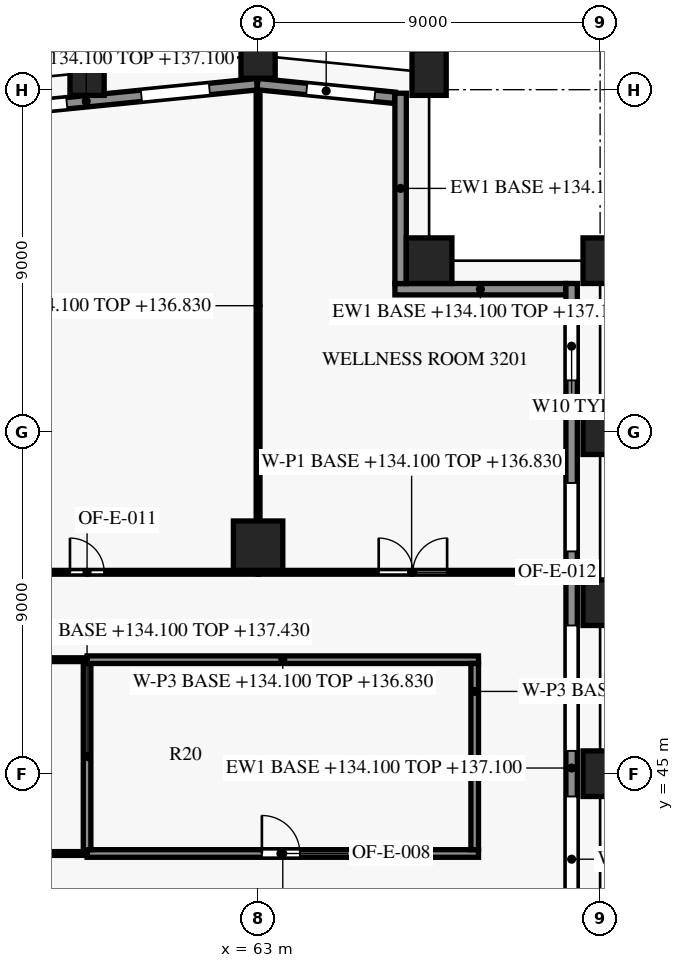
"""IFC4 building model, lengths in metres.
Left out: names, types, materials, properties, quantities, classifications, styles, units other than length and angle.
Written with IfcOpenShell. Run it as: python <this file> out.ifc"""

import sys

from ifc_helpers import new_model, si_unit, direction, frame, frame_2d, origin, origin_2d, place, context, subcontext, project, spatial, rectangle, extrude, element, fill, save


model = new_model("IFC4")
c1 = context("Model", 3, precision=1e-05, world=origin(), true_north=direction((0.0, 1.0)))
c2 = subcontext(c1, "Body", "Model", "MODEL_VIEW")
j1 = project(units=[si_unit("LENGTHUNIT", "METRE"), si_unit("PLANEANGLEUNIT", "RADIAN")], contexts=[c1])
p1 = place(None, origin())
s1 = spatial("IfcSite", under=j1, at=p1, CompositionType="ELEMENT")
p2 = place(p1, origin())
s2 = spatial("IfcBuilding", under=s1, at=p2, CompositionType="ELEMENT")
p3 = place(p2, frame((0.0, 0.0, 134.1)))
s3 = spatial("IfcBuildingStorey", under=s2, at=p3, CompositionType="ELEMENT", Elevation=134.1)
for number, where, z_axis, x_axis in (
    (1, (72.0, 45.0, 0.0), (0.0, 0.0, 1.0), (0.0, 1.0, 0.0)),
    (2, (72.0, 49.5, 0.0), (0.0, 0.0, 1.0), (0.0, 1.0, 0.0)),
    (3, (72.0, 54.0, 0.0), (0.0, 0.0, 1.0), (0.0, 1.0, 0.0)),
    (4, (72.0, 58.5, 0.0), (0.0, 0.0, 1.0), (0.0, 1.0, 0.0)),
    (5, (67.5, 63.45, 0.0), (0.0, 0.0, 1.0), (-0.995, 0.1, 0.0)),
    (6, (63.0, 63.9, 0.0), (0.0, 0.0, 1.0), (-1.0, 0.0, 0.0)),
    (7, (58.5, 63.45, 0.0), (0.0, 0.0, 1.0), (-0.995, -0.1, 0.0)),
):
    element("IfcColumn", number, at=place(p3, frame(where, z_axis=z_axis, x_axis=x_axis)), inside=s3, PredefinedType="COLUMN", context=c2, shape_type="SweptSolid", body=[
        extrude(rectangle(XDim=0.9, YDim=1.2, at=origin_2d()), origin(), (0.0, 0.0, 1.0), 3.8),
    ])
p4 = place(p3, frame((67.5, 58.5, 0.0), z_axis=(0.0, 0.0, 1.0), x_axis=(1.0, 0.0, 0.0)))
e8 = element("IfcColumn", 8, at=p4, inside=s3, PredefinedType="COLUMN", context=c2, shape_type="SweptSolid", body=[
    extrude(rectangle(XDim=1.2, YDim=1.2, at=origin_2d()), origin(), (0.0, 0.0, 1.0), 3.8),
])
p5 = place(p3, frame((63.0, 51.0, 0.0), z_axis=(0.0, 0.0, 1.0), x_axis=(1.0, 0.0, 0.0)))
e9 = element("IfcColumn", 9, at=p5, inside=s3, PredefinedType="COLUMN", context=c2, shape_type="SweptSolid", body=[
    extrude(rectangle(XDim=1.3, YDim=1.3, at=origin_2d()), origin(), (0.0, 0.0, 1.0), 3.8),
])
p6 = place(p3, frame((71.25, 57.9, 0.0), z_axis=(0.0, 0.0, 1.0), x_axis=(0.0, -1.0, 0.0)))
e10 = element("IfcWall", 10, at=p6, inside=s3, PredefinedType="SOLIDWALL", context=c2, shape_type="SweptSolid", body=[
    extrude(rectangle(XDim=25.502, YDim=0.3, at=frame_2d((12.751, 0.0))), origin(), (0.0, 0.0, 1.0), 3.0),
])
p7 = place(p6, frame((0.75, 0.0, 0.75)))
e11 = element("IfcOpeningElement", 11, at=p7, cuts=e10, PredefinedType="OPENING", context=c2, shape_type="SweptSolid", body=[
    extrude(rectangle(XDim=1.8, YDim=1.8, at=frame_2d((0.9, 0.9))), frame((0.0, 0.16, 0.0), z_axis=(0.0, -1.0, 0.0), x_axis=(1.0, 0.0, 0.0)), (0.0, 0.0, 1.0), 0.32),
])
p8 = place(p6, frame((5.25, 0.0, 0.75)))
e12 = element("IfcOpeningElement", 12, at=p8, cuts=e10, PredefinedType="OPENING", context=c2, shape_type="SweptSolid", body=[
    extrude(rectangle(XDim=1.8, YDim=1.8, at=frame_2d((0.9, 0.9))), frame((0.0, 0.16, 0.0), z_axis=(0.0, -1.0, 0.0), x_axis=(1.0, 0.0, 0.0)), (0.0, 0.0, 1.0), 0.32),
])
p9 = place(p6, frame((9.0, 0.0, 0.15)))
e13 = element("IfcOpeningElement", 13, at=p9, cuts=e10, PredefinedType="OPENING", context=c2, shape_type="SweptSolid", body=[
    extrude(rectangle(XDim=3.3, YDim=2.4, at=frame_2d((1.65, 1.2))), frame((0.0, 0.16, 0.0), z_axis=(0.0, -1.0, 0.0), x_axis=(1.0, 0.0, 0.0)), (0.0, 0.0, 1.0), 0.32),
])
p10 = place(p6, frame((13.5, 0.0, 0.15)))
e14 = element("IfcOpeningElement", 14, at=p10, cuts=e10, PredefinedType="OPENING", context=c2, shape_type="SweptSolid", body=[
    extrude(rectangle(XDim=3.3, YDim=2.4, at=frame_2d((1.65, 1.2))), frame((0.0, 0.16, 0.0), z_axis=(0.0, -1.0, 0.0), x_axis=(1.0, 0.0, 0.0)), (0.0, 0.0, 1.0), 0.32),
])
p11 = place(p6, frame((18.75, 0.0, 0.75)))
e15 = element("IfcOpeningElement", 15, at=p11, cuts=e10, PredefinedType="OPENING", context=c2, shape_type="SweptSolid", body=[
    extrude(rectangle(XDim=1.8, YDim=1.8, at=frame_2d((0.9, 0.9))), frame((0.0, 0.16, 0.0), z_axis=(0.0, -1.0, 0.0), x_axis=(1.0, 0.0, 0.0)), (0.0, 0.0, 1.0), 0.32),
])
p12 = place(p6, frame((23.25, 0.0, 0.75)))
e16 = element("IfcOpeningElement", 16, at=p12, cuts=e10, PredefinedType="OPENING", context=c2, shape_type="SweptSolid", body=[
    extrude(rectangle(XDim=1.8, YDim=1.8, at=frame_2d((0.9, 0.9))), frame((0.0, 0.16, 0.0), z_axis=(0.0, -1.0, 0.0), x_axis=(1.0, 0.0, 0.0)), (0.0, 0.0, 1.0), 0.32),
])
p13 = place(p3, frame((66.6, 57.75, 0.0), z_axis=(0.0, 0.0, 1.0), x_axis=(1.0, 0.0, 0.0)))
e17 = element("IfcWall", 17, at=p13, inside=s3, PredefinedType="SOLIDWALL", context=c2, shape_type="SweptSolid", body=[
    extrude(rectangle(XDim=4.5, YDim=0.3, at=frame_2d((2.25, 0.0))), origin(), (0.0, 0.0, 1.0), 3.0),
])
p14 = place(p3, frame((66.75, 62.907, 0.0), z_axis=(0.0, 0.0, 1.0), x_axis=(0.0, -1.0, 0.0)))
e18 = element("IfcWall", 18, at=p14, inside=s3, PredefinedType="SOLIDWALL", context=c2, shape_type="SweptSolid", body=[
    extrude(rectangle(XDim=5.009, YDim=0.3, at=frame_2d((2.504, 0.0))), origin(), (0.0, 0.0, 1.0), 3.0),
])
p15 = place(p3, frame((62.985, 63.148, 0.0), z_axis=(0.0, 0.0, 1.0), x_axis=(0.995038521274, -0.099490407478, 0.0)))
e19 = element("IfcWall", 19, at=p15, inside=s3, PredefinedType="SOLIDWALL", context=c2, shape_type="SweptSolid", body=[
    extrude(rectangle(XDim=3.632, YDim=0.3, at=frame_2d((1.816, 0.0))), origin(), (0.0, 0.0, 1.0), 3.0),
])
p16 = place(p15, frame((1.301, 0.0, 0.75)))
e20 = element("IfcOpeningElement", 20, at=p16, cuts=e19, PredefinedType="OPENING", context=c2, shape_type="SweptSolid", body=[
    extrude(rectangle(XDim=1.8, YDim=1.8, at=frame_2d((0.9, 0.9))), frame((0.0, 0.16, 0.0), z_axis=(0.0, -1.0, 0.0), x_axis=(1.0, 0.0, 0.0)), (0.0, 0.0, 1.0), 0.32),
])
p17 = place(p3, frame((53.985, 62.245, 0.0), z_axis=(0.0, 0.0, 1.0), x_axis=(0.995037993253, 0.099495688264, 0.0)))
e21 = element("IfcWall", 21, at=p17, inside=s3, PredefinedType="SOLIDWALL", context=c2, shape_type="SweptSolid", body=[
    extrude(rectangle(XDim=9.03, YDim=0.3, at=frame_2d((4.515, 0.0))), origin(), (0.0, 0.0, 1.0), 3.0),
])
p18 = place(p17, frame((0.701, 0.0, 0.15)))
e22 = element("IfcOpeningElement", 22, at=p18, cuts=e21, PredefinedType="OPENING", context=c2, shape_type="SweptSolid", body=[
    extrude(rectangle(XDim=3.3, YDim=2.4, at=frame_2d((1.65, 1.2))), frame((0.0, 0.16, 0.0), z_axis=(0.0, -1.0, 0.0), x_axis=(1.0, 0.0, 0.0)), (0.0, 0.0, 1.0), 0.32),
])
p19 = place(p17, frame((5.974, 0.0, 0.75)))
e23 = element("IfcOpeningElement", 23, at=p19, cuts=e21, PredefinedType="OPENING", context=c2, shape_type="SweptSolid", body=[
    extrude(rectangle(XDim=1.8, YDim=1.8, at=frame_2d((0.9, 0.9))), frame((0.0, 0.16, 0.0), z_axis=(0.0, -1.0, 0.0), x_axis=(1.0, 0.0, 0.0)), (0.0, 0.0, 1.0), 0.32),
])
p20 = place(p3, frame((51.3, 42.9, 0.0), z_axis=(0.0, 0.0, 1.0), x_axis=(1.0, 0.0, 0.0)))
e24 = element("IfcWall", 24, at=p20, inside=s3, PredefinedType="PARTITIONING", context=c2, shape_type="SweptSolid", body=[
    extrude(rectangle(XDim=7.2, YDim=0.1, at=frame_2d((3.6, 0.0))), origin(), (0.0, 0.0, 1.0), 2.63),
])
p21 = place(p3, frame((58.5, 42.9, 0.0), z_axis=(0.0, 0.0, 1.0), x_axis=(1.0, 0.0, 0.0)))
e25 = element("IfcWall", 25, at=p21, inside=s3, PredefinedType="PARTITIONING", context=c2, shape_type="SweptSolid", body=[
    extrude(rectangle(XDim=10.3, YDim=0.2, at=frame_2d((5.15, 0.0))), origin(), (0.0, 0.0, 1.0), 2.73),
])
p22 = place(p21, frame((4.6, 0.0, 0.0)))
e26 = element("IfcOpeningElement", 26, at=p22, cuts=e25, PredefinedType="OPENING", context=c2, shape_type="SweptSolid", body=[
    extrude(rectangle(XDim=1.0, YDim=2.1, at=frame_2d((0.5, 1.05))), frame((0.0, 0.11, 0.0), z_axis=(0.0, -1.0, 0.0), x_axis=(1.0, 0.0, 0.0)), (0.0, 0.0, 1.0), 0.22),
])
for number, where, z_axis, x_axis in (
    (27, (68.7, 43.0, 0.0), (0.0, 0.0, 1.0), (0.0, 1.0, 0.0)),
    (28, (58.5, 47.9, 0.0), (0.0, 0.0, 1.0), (0.0, -1.0, 0.0)),
):
    element("IfcWall", number, at=place(p3, frame(where, z_axis=z_axis, x_axis=x_axis)), inside=s3, PredefinedType="PARTITIONING", context=c2, shape_type="SweptSolid", body=[
        extrude(rectangle(XDim=4.9, YDim=0.2, at=frame_2d((2.45, 0.0))), origin(), (0.0, 0.0, 1.0), 3.33),
    ])
p23 = place(p3, frame((58.5, 48.0, 0.0), z_axis=(0.0, 0.0, 1.0), x_axis=(-1.0, 0.0, 0.0)))
e29 = element("IfcWall", 29, at=p23, inside=s3, PredefinedType="PARTITIONING", context=c2, shape_type="SweptSolid", body=[
    extrude(rectangle(XDim=13.5, YDim=0.1, at=frame_2d((6.75, 0.0))), origin(), (0.0, 0.0, 1.0), 2.73),
])
p24 = place(p23, frame((8.1, 0.0, 0.0)))
e30 = element("IfcOpeningElement", 30, at=p24, cuts=e29, PredefinedType="OPENING", context=c2, shape_type="SweptSolid", body=[
    extrude(rectangle(XDim=1.8, YDim=2.1, at=frame_2d((0.9, 1.05))), frame((0.0, 0.06, 0.0), z_axis=(0.0, -1.0, 0.0), x_axis=(1.0, 0.0, 0.0)), (0.0, 0.0, 1.0), 0.12),
])
p25 = place(p3, frame((68.8, 48.0, 0.0), z_axis=(0.0, 0.0, 1.0), x_axis=(-1.0, 0.0, 0.0)))
e31 = element("IfcWall", 31, at=p25, inside=s3, PredefinedType="PARTITIONING", context=c2, shape_type="SweptSolid", body=[
    extrude(rectangle(XDim=10.3, YDim=0.2, at=frame_2d((5.15, 0.0))), origin(), (0.0, 0.0, 1.0), 2.73),
])
p26 = place(p3, frame((45.0, 50.3, 0.0), z_axis=(0.0, 0.0, 1.0), x_axis=(1.0, 0.0, 0.0)))
e32 = element("IfcWall", 32, at=p26, inside=s3, PredefinedType="PARTITIONING", context=c2, shape_type="SweptSolid", body=[
    extrude(rectangle(XDim=18.0, YDim=0.1, at=frame_2d((9.0, 0.0))), origin(), (0.0, 0.0, 1.0), 2.73),
])
p27 = place(p26, frame((13.05, 0.0, 0.0)))
e33 = element("IfcOpeningElement", 33, at=p27, cuts=e32, PredefinedType="OPENING", context=c2, shape_type="SweptSolid", body=[
    extrude(rectangle(XDim=0.9, YDim=2.1, at=frame_2d((0.45, 1.05))), frame((0.0, 0.06, 0.0), z_axis=(0.0, -1.0, 0.0), x_axis=(1.0, 0.0, 0.0)), (0.0, 0.0, 1.0), 0.12),
])
p28 = place(p3, frame((63.0, 50.3, 0.0), z_axis=(0.0, 0.0, 1.0), x_axis=(1.0, 0.0, 0.0)))
e34 = element("IfcWall", 34, at=p28, inside=s3, PredefinedType="PARTITIONING", context=c2, shape_type="SweptSolid", body=[
    extrude(rectangle(XDim=8.08, YDim=0.1, at=frame_2d((4.04, 0.0))), origin(), (0.0, 0.0, 1.0), 2.73),
])
p29 = place(p28, frame((3.174, 0.0, 0.0)))
e35 = element("IfcOpeningElement", 35, at=p29, cuts=e34, PredefinedType="OPENING", context=c2, shape_type="SweptSolid", body=[
    extrude(rectangle(XDim=1.8, YDim=2.1, at=frame_2d((0.9, 1.05))), frame((0.0, 0.06, 0.0), z_axis=(0.0, -1.0, 0.0), x_axis=(1.0, 0.0, 0.0)), (0.0, 0.0, 1.0), 0.12),
])
p30 = place(p3, frame((63.0, 62.976, 0.0), z_axis=(0.0, 0.0, 1.0), x_axis=(0.0, -1.0, 0.0)))
e36 = element("IfcWall", 36, at=p30, inside=s3, PredefinedType="PARTITIONING", context=c2, shape_type="SweptSolid", body=[
    extrude(rectangle(XDim=11.321, YDim=0.1, at=frame_2d((5.66, 0.0))), origin(), (0.0, 0.0, 1.0), 2.73),
])
p31 = place(p7, origin())
e37 = element("IfcWindow", 37, at=p31, inside=s3, PartitioningType="SINGLE_PANEL", PredefinedType="WINDOW", context=c2, shape_type="SweptSolid", body=[
    extrude(rectangle(XDim=1.8, YDim=1.8, at=frame_2d((0.9, 0.9))), frame((0.0, 0.03, 0.0), z_axis=(0.0, -1.0, 0.0), x_axis=(1.0, 0.0, 0.0)), (0.0, 0.0, 1.0), 0.06),
])
fill(e11, e37)
p32 = place(p8, origin())
e38 = element("IfcWindow", 38, at=p32, inside=s3, PartitioningType="SINGLE_PANEL", PredefinedType="WINDOW", context=c2, shape_type="SweptSolid", body=[
    extrude(rectangle(XDim=1.8, YDim=1.8, at=frame_2d((0.9, 0.9))), frame((0.0, 0.03, 0.0), z_axis=(0.0, -1.0, 0.0), x_axis=(1.0, 0.0, 0.0)), (0.0, 0.0, 1.0), 0.06),
])
fill(e12, e38)
p33 = place(p9, origin())
e39 = element("IfcWindow", 39, at=p33, inside=s3, PartitioningType="SINGLE_PANEL", PredefinedType="WINDOW", context=c2, shape_type="SweptSolid", body=[
    extrude(rectangle(XDim=3.3, YDim=2.4, at=frame_2d((1.65, 1.2))), frame((0.0, 0.03, 0.0), z_axis=(0.0, -1.0, 0.0), x_axis=(1.0, 0.0, 0.0)), (0.0, 0.0, 1.0), 0.06),
])
fill(e13, e39)
p34 = place(p10, origin())
e40 = element("IfcWindow", 40, at=p34, inside=s3, PartitioningType="SINGLE_PANEL", PredefinedType="WINDOW", context=c2, shape_type="SweptSolid", body=[
    extrude(rectangle(XDim=3.3, YDim=2.4, at=frame_2d((1.65, 1.2))), frame((0.0, 0.03, 0.0), z_axis=(0.0, -1.0, 0.0), x_axis=(1.0, 0.0, 0.0)), (0.0, 0.0, 1.0), 0.06),
])
fill(e14, e40)
p35 = place(p16, origin())
e41 = element("IfcWindow", 41, at=p35, inside=s3, PartitioningType="SINGLE_PANEL", PredefinedType="WINDOW", context=c2, shape_type="SweptSolid", body=[
    extrude(rectangle(XDim=1.8, YDim=1.8, at=frame_2d((0.9, 0.9))), frame((0.0, 0.03, 0.0), z_axis=(0.0, -1.0, 0.0), x_axis=(1.0, 0.0, 0.0)), (0.0, 0.0, 1.0), 0.06),
])
fill(e20, e41)
p36 = place(p18, origin())
e42 = element("IfcWindow", 42, at=p36, inside=s3, PartitioningType="SINGLE_PANEL", PredefinedType="WINDOW", context=c2, shape_type="SweptSolid", body=[
    extrude(rectangle(XDim=3.3, YDim=2.4, at=frame_2d((1.65, 1.2))), frame((0.0, 0.03, 0.0), z_axis=(0.0, -1.0, 0.0), x_axis=(1.0, 0.0, 0.0)), (0.0, 0.0, 1.0), 0.06),
])
fill(e22, e42)
p37 = place(p19, origin())
e43 = element("IfcWindow", 43, at=p37, inside=s3, PartitioningType="SINGLE_PANEL", PredefinedType="WINDOW", context=c2, shape_type="SweptSolid", body=[
    extrude(rectangle(XDim=1.8, YDim=1.8, at=frame_2d((0.9, 0.9))), frame((0.0, 0.03, 0.0), z_axis=(0.0, -1.0, 0.0), x_axis=(1.0, 0.0, 0.0)), (0.0, 0.0, 1.0), 0.06),
])
fill(e23, e43)
p38 = place(p22, origin())
e44 = element("IfcDoor", 44, at=p38, inside=s3, OperationType="SINGLE_SWING_RIGHT", PredefinedType="DOOR", context=c2, shape_type="SweptSolid", body=[
    extrude(rectangle(XDim=1.0, YDim=2.1, at=frame_2d((0.5, 1.05))), frame((0.0, 0.025, 0.0), z_axis=(0.0, -1.0, 0.0), x_axis=(1.0, 0.0, 0.0)), (0.0, 0.0, 1.0), 0.05),
])
fill(e26, e44)
p39 = place(p27, origin())
e45 = element("IfcDoor", 45, at=p39, inside=s3, OperationType="SINGLE_SWING_LEFT", PredefinedType="DOOR", context=c2, shape_type="SweptSolid", body=[
    extrude(rectangle(XDim=0.9, YDim=2.1, at=frame_2d((0.45, 1.05))), frame((0.0, 0.025, 0.0), z_axis=(0.0, -1.0, 0.0), x_axis=(1.0, 0.0, 0.0)), (0.0, 0.0, 1.0), 0.05),
])
fill(e33, e45)
p40 = place(p29, origin())
e46 = element("IfcDoor", 46, at=p40, inside=s3, OperationType="DOUBLE_DOOR_SINGLE_SWING", PredefinedType="DOOR", context=c2, shape_type="SweptSolid", body=[
    extrude(rectangle(XDim=1.8, YDim=2.1, at=frame_2d((0.9, 1.05))), frame((0.0, 0.025, 0.0), z_axis=(0.0, -1.0, 0.0), x_axis=(1.0, 0.0, 0.0)), (0.0, 0.0, 1.0), 0.05),
])
fill(e35, e46)
save(model, sys.argv[1])
